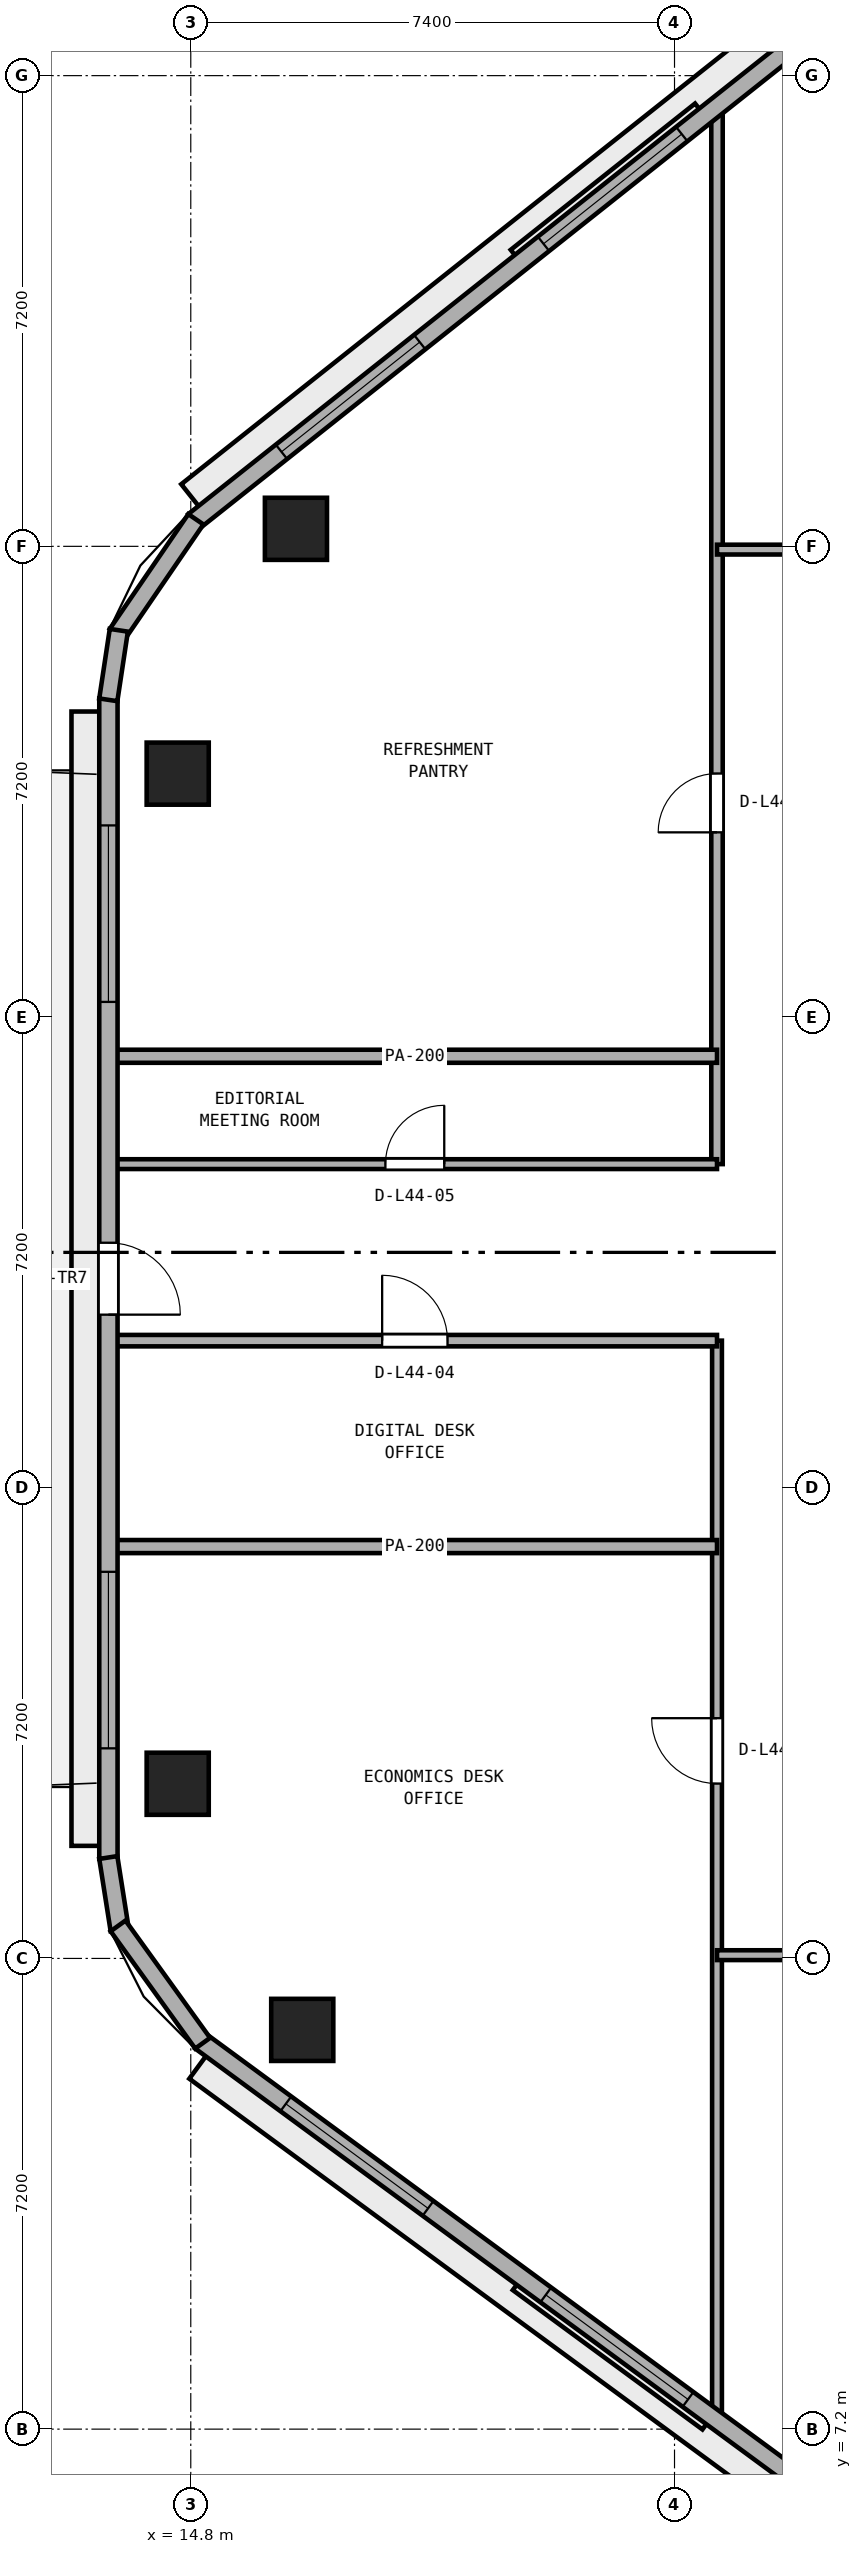
"""IFC4 building model, lengths in metres.
Left out: names, types, materials, properties, quantities, classifications, styles, units other than length and angle.
Written with IfcOpenShell. Run it as: python <this file> out.ifc"""

import sys

from ifc_helpers import new_model, si_unit, direction, frame, frame_2d, origin, origin_2d, place, context, subcontext, project, spatial, rectangle, extrude, element, fill, save


model = new_model("IFC4")
c1 = context("Model", 3, precision=1e-05, world=origin(), true_north=direction((0.0, 1.0)))
c2 = subcontext(c1, "Body", "Model", "MODEL_VIEW")
j1 = project(units=[si_unit("LENGTHUNIT", "METRE"), si_unit("PLANEANGLEUNIT", "RADIAN")], contexts=[c1])
p1 = place(None, origin())
s1 = spatial("IfcSite", under=j1, at=p1, CompositionType="ELEMENT")
p2 = place(p1, origin())
s2 = spatial("IfcBuilding", under=s1, at=p2, CompositionType="ELEMENT")
p3 = place(p2, frame((0.0, 0.0, 174.4)))
s3 = spatial("IfcBuildingStorey", under=s2, at=p3, CompositionType="ELEMENT", Elevation=174.4)
for number, where, z_axis, x_axis in (
    (1, (16.409, 36.268, 0.0), (0.0, 0.0, 1.0), (1.0, 0.0, 0.0)),
    (2, (14.6, 32.523, 0.0), (0.0, 0.0, 1.0), (1.0, 0.0, 0.0)),
    (3, (14.6, 17.072, 0.0), (0.0, 0.0, 1.0), (1.0, 0.0, 0.0)),
    (4, (16.505, 13.307, 0.0), (0.0, 0.0, 1.0), (1.0, 0.0, 0.0)),
):
    element("IfcColumn", number, at=place(p3, frame(where, z_axis=z_axis, x_axis=x_axis)), inside=s3, PredefinedType="COLUMN", context=c2, shape_type="SweptSolid", body=[
        extrude(rectangle(XDim=0.95, YDim=0.95, at=origin_2d()), origin(), (0.0, 0.0, 1.0), 3.8),
    ])
p4 = place(p3, frame((22.85, 7.295, 0.0), z_axis=(0.0, 0.0, 1.0), x_axis=(0.0, 1.0, 0.0)))
e5 = element("IfcWall", 5, at=p4, inside=s3, PredefinedType="PARTITIONING", context=c2, shape_type="SweptSolid", body=[
    extrude(rectangle(XDim=16.555, YDim=0.15, at=frame_2d((8.277, 0.0))), origin(), (0.0, 0.0, 1.0), 3.54),
])
p5 = place(p4, frame((9.78, 0.0, 0.0)))
e6 = element("IfcOpeningElement", 6, at=p5, cuts=e5, PredefinedType="OPENING", context=c2, shape_type="SweptSolid", body=[
    extrude(rectangle(XDim=1.0, YDim=2.12, at=frame_2d((0.5, 1.06))), frame((0.0, 0.085, 0.0), z_axis=(0.0, -1.0, 0.0), x_axis=(1.0, 0.0, 0.0)), (0.0, 0.0, 1.0), 0.17),
])
p6 = place(p3, frame((22.85, 26.55, 0.0), z_axis=(0.0, 0.0, 1.0), x_axis=(0.0, 1.0, 0.0)))
e7 = element("IfcWall", 7, at=p6, inside=s3, PredefinedType="PARTITIONING", context=c2, shape_type="SweptSolid", body=[
    extrude(rectangle(XDim=16.222, YDim=0.175, at=frame_2d((8.111, 0.0))), origin(), (0.0, 0.0, 1.0), 3.54),
])
p7 = place(p6, frame((5.075, 0.0, 0.0)))
e8 = element("IfcOpeningElement", 8, at=p7, cuts=e7, PredefinedType="OPENING", context=c2, shape_type="SweptSolid", body=[
    extrude(rectangle(XDim=0.9, YDim=2.1, at=frame_2d((0.45, 1.05))), frame((0.0, 0.097, 0.0), z_axis=(0.0, -1.0, 0.0), x_axis=(1.0, 0.0, 0.0)), (0.0, 0.0, 1.0), 0.195),
])
p8 = place(p3, frame((22.85, 14.45, 0.0), z_axis=(0.0, 0.0, 1.0), x_axis=(1.0, 0.0, 0.0)))
e9 = element("IfcWall", 9, at=p8, inside=s3, PredefinedType="PARTITIONING", context=c2, shape_type="SweptSolid", body=[
    extrude(rectangle(XDim=28.3, YDim=0.15, at=frame_2d((14.15, 0.0))), origin(), (0.0, 0.0, 1.0), 3.54),
])
p9 = place(p8, frame((13.65, 0.0, 0.0)))
e10 = element("IfcOpeningElement", 10, at=p9, cuts=e9, PredefinedType="OPENING", context=c2, shape_type="SweptSolid", body=[
    extrude(rectangle(XDim=1.0, YDim=2.12, at=frame_2d((0.5, 1.06))), frame((0.0, 0.085, 0.0), z_axis=(0.0, -1.0, 0.0), x_axis=(1.0, 0.0, 0.0)), (0.0, 0.0, 1.0), 0.17),
])
p10 = place(p3, frame((13.605, 20.7, 0.0), z_axis=(0.0, 0.0, 1.0), x_axis=(1.0, 0.0, 0.0)))
e11 = element("IfcWall", 11, at=p10, inside=s3, PredefinedType="PARTITIONING", context=c2, shape_type="SweptSolid", body=[
    extrude(rectangle(XDim=9.245, YDim=0.2, at=frame_2d((4.623, 0.0))), origin(), (0.0, 0.0, 1.0), 3.54),
])
p11 = place(p3, frame((13.605, 23.85, 0.0), z_axis=(0.0, 0.0, 1.0), x_axis=(1.0, 0.0, 0.0)))
e12 = element("IfcWall", 12, at=p11, inside=s3, PredefinedType="PARTITIONING", context=c2, shape_type="SweptSolid", body=[
    extrude(rectangle(XDim=9.245, YDim=0.175, at=frame_2d((4.623, 0.0))), origin(), (0.0, 0.0, 1.0), 3.54),
])
p12 = place(p11, frame((4.123, 0.0, 0.0)))
e13 = element("IfcOpeningElement", 13, at=p12, cuts=e12, PredefinedType="OPENING", context=c2, shape_type="SweptSolid", body=[
    extrude(rectangle(XDim=1.0, YDim=2.12, at=frame_2d((0.5, 1.06))), frame((0.0, 0.097, 0.0), z_axis=(0.0, -1.0, 0.0), x_axis=(1.0, 0.0, 0.0)), (0.0, 0.0, 1.0), 0.195),
])
p13 = place(p3, frame((13.605, 26.55, 0.0), z_axis=(0.0, 0.0, 1.0), x_axis=(1.0, 0.0, 0.0)))
e14 = element("IfcWall", 14, at=p13, inside=s3, PredefinedType="PARTITIONING", context=c2, shape_type="SweptSolid", body=[
    extrude(rectangle(XDim=9.245, YDim=0.15, at=frame_2d((4.623, 0.0))), origin(), (0.0, 0.0, 1.0), 3.54),
])
p14 = place(p13, frame((4.173, 0.0, 0.0)))
e15 = element("IfcOpeningElement", 15, at=p14, cuts=e14, PredefinedType="OPENING", context=c2, shape_type="SweptSolid", body=[
    extrude(rectangle(XDim=0.9, YDim=2.1, at=frame_2d((0.45, 1.05))), frame((0.0, 0.085, 0.0), z_axis=(0.0, -1.0, 0.0), x_axis=(1.0, 0.0, 0.0)), (0.0, 0.0, 1.0), 0.17),
])
p15 = place(p3, frame((13.605, 28.2, 0.0), z_axis=(0.0, 0.0, 1.0), x_axis=(1.0, 0.0, 0.0)))
e16 = element("IfcWall", 16, at=p15, inside=s3, PredefinedType="PARTITIONING", context=c2, shape_type="SweptSolid", body=[
    extrude(rectangle(XDim=9.245, YDim=0.2, at=frame_2d((4.623, 0.0))), origin(), (0.0, 0.0, 1.0), 3.54),
])
p16 = place(p3, frame((22.85, 35.95, 0.0), z_axis=(0.0, 0.0, 1.0), x_axis=(1.0, 0.0, 0.0)))
e17 = element("IfcWall", 17, at=p16, inside=s3, PredefinedType="PARTITIONING", context=c2, shape_type="SweptSolid", body=[
    extrude(rectangle(XDim=11.55, YDim=0.15, at=frame_2d((5.775, 0.0))), origin(), (0.0, 0.0, 1.0), 3.54),
])
p17 = place(p16, frame((5.275, 0.0, 0.0)))
e18 = element("IfcOpeningElement", 18, at=p17, cuts=e17, PredefinedType="OPENING", context=c2, shape_type="SweptSolid", body=[
    extrude(rectangle(XDim=1.0, YDim=2.12, at=frame_2d((0.5, 1.06))), frame((0.0, 0.085, 0.0), z_axis=(0.0, -1.0, 0.0), x_axis=(1.0, 0.0, 0.0)), (0.0, 0.0, 1.0), 0.17),
])
p18 = place(p3, frame((27.658, 46.55, 0.0), z_axis=(0.0, 0.0, 1.0), x_axis=(-0.783266285861, -0.621686356158, 0.0)))
e19 = element("IfcWall", 19, at=p18, inside=s3, PredefinedType="STANDARD", context=c2, shape_type="SweptSolid", body=[
    extrude(rectangle(XDim=16.353, YDim=0.28, at=frame_2d((8.177, 0.0))), origin(), (0.0, 0.0, 1.0), 3.54),
])
p19 = place(p18, frame((1.709, 0.0, 0.9)))
e20 = element("IfcOpeningElement", 20, at=p19, cuts=e19, PredefinedType="OPENING", context=c2, shape_type="SweptSolid", body=[
    extrude(rectangle(XDim=2.7, YDim=1.75, at=frame_2d((1.35, 0.875))), frame((0.0, 0.15, 0.0), z_axis=(0.0, -1.0, 0.0), x_axis=(1.0, 0.0, 0.0)), (0.0, 0.0, 1.0), 0.3),
])
p20 = place(p18, frame((6.826, 0.0, 0.9)))
e21 = element("IfcOpeningElement", 21, at=p20, cuts=e19, PredefinedType="OPENING", context=c2, shape_type="SweptSolid", body=[
    extrude(rectangle(XDim=2.7, YDim=1.75, at=frame_2d((1.35, 0.875))), frame((0.0, 0.15, 0.0), z_axis=(0.0, -1.0, 0.0), x_axis=(1.0, 0.0, 0.0)), (0.0, 0.0, 1.0), 0.3),
])
p21 = place(p18, frame((11.944, 0.0, 0.9)))
e22 = element("IfcOpeningElement", 22, at=p21, cuts=e19, PredefinedType="OPENING", context=c2, shape_type="SweptSolid", body=[
    extrude(rectangle(XDim=2.7, YDim=1.75, at=frame_2d((1.35, 0.875))), frame((0.0, 0.15, 0.0), z_axis=(0.0, -1.0, 0.0), x_axis=(1.0, 0.0, 0.0)), (0.0, 0.0, 1.0), 0.3),
])
p22 = place(p3, frame((13.54, 33.673, 0.0), z_axis=(0.0, 0.0, 1.0), x_axis=(0.0, -1.0, 0.0)))
e23 = element("IfcWall", 23, at=p22, inside=s3, PredefinedType="STANDARD", context=c2, shape_type="SweptSolid", body=[
    extrude(rectangle(XDim=17.751, YDim=0.28, at=frame_2d((8.875, 0.0))), origin(), (0.0, 0.0, 1.0), 3.54),
])
p23 = place(p22, frame((8.326, 0.0, 0.0)))
e24 = element("IfcOpeningElement", 24, at=p23, cuts=e23, PredefinedType="OPENING", context=c2, shape_type="SweptSolid", body=[
    extrude(rectangle(XDim=1.1, YDim=2.2, at=frame_2d((0.55, 1.1))), frame((0.0, 0.15, 0.0), z_axis=(0.0, -1.0, 0.0), x_axis=(1.0, 0.0, 0.0)), (0.0, 0.0, 1.0), 0.3),
])
p24 = place(p22, frame((1.942, 0.0, 0.9)))
e25 = element("IfcOpeningElement", 25, at=p24, cuts=e23, PredefinedType="OPENING", context=c2, shape_type="SweptSolid", body=[
    extrude(rectangle(XDim=2.7, YDim=1.75, at=frame_2d((1.35, 0.875))), frame((0.0, 0.15, 0.0), z_axis=(0.0, -1.0, 0.0), x_axis=(1.0, 0.0, 0.0)), (0.0, 0.0, 1.0), 0.3),
])
p25 = place(p22, frame((13.359, 0.0, 0.9)))
e26 = element("IfcOpeningElement", 26, at=p25, cuts=e23, PredefinedType="OPENING", context=c2, shape_type="SweptSolid", body=[
    extrude(rectangle(XDim=2.7, YDim=1.75, at=frame_2d((1.35, 0.875))), frame((0.0, 0.15, 0.0), z_axis=(0.0, -1.0, 0.0), x_axis=(1.0, 0.0, 0.0)), (0.0, 0.0, 1.0), 0.3),
])
p26 = place(p3, frame((14.951, 13.134, 0.0), z_axis=(0.0, 0.0, 1.0), x_axis=(0.805804940328, -0.592181051827, 0.0)))
e27 = element("IfcWall", 27, at=p26, inside=s3, PredefinedType="STANDARD", context=c2, shape_type="SweptSolid", body=[
    extrude(rectangle(XDim=15.804, YDim=0.28, at=frame_2d((7.902, 0.0))), origin(), (0.0, 0.0, 1.0), 3.54),
])
p27 = place(p26, frame((1.617, 0.0, 0.9)))
e28 = element("IfcOpeningElement", 28, at=p27, cuts=e27, PredefinedType="OPENING", context=c2, shape_type="SweptSolid", body=[
    extrude(rectangle(XDim=2.7, YDim=1.75, at=frame_2d((1.35, 0.875))), frame((0.0, 0.15, 0.0), z_axis=(0.0, -1.0, 0.0), x_axis=(1.0, 0.0, 0.0)), (0.0, 0.0, 1.0), 0.3),
])
p28 = place(p26, frame((6.552, 0.0, 0.9)))
e29 = element("IfcOpeningElement", 29, at=p28, cuts=e27, PredefinedType="OPENING", context=c2, shape_type="SweptSolid", body=[
    extrude(rectangle(XDim=2.7, YDim=1.75, at=frame_2d((1.35, 0.875))), frame((0.0, 0.15, 0.0), z_axis=(0.0, -1.0, 0.0), x_axis=(1.0, 0.0, 0.0)), (0.0, 0.0, 1.0), 0.3),
])
p29 = place(p26, frame((11.487, 0.0, 0.9)))
e30 = element("IfcOpeningElement", 30, at=p29, cuts=e27, PredefinedType="OPENING", context=c2, shape_type="SweptSolid", body=[
    extrude(rectangle(XDim=2.7, YDim=1.75, at=frame_2d((1.35, 0.875))), frame((0.0, 0.15, 0.0), z_axis=(0.0, -1.0, 0.0), x_axis=(1.0, 0.0, 0.0)), (0.0, 0.0, 1.0), 0.3),
])
p30 = place(p3, frame((14.878, 36.414, 0.0), z_axis=(0.0, 0.0, 1.0), x_axis=(-0.564564614133, -0.825388875906, 0.0)))
e31 = element("IfcWall", 31, at=p30, inside=s3, PredefinedType="STANDARD", context=c2, shape_type="SweptSolid", body=[
    extrude(rectangle(XDim=2.128, YDim=0.28, at=frame_2d((1.064, 0.0))), origin(), (0.0, 0.0, 1.0), 3.54),
])
p31 = place(p3, frame((13.699, 34.716, 0.0), z_axis=(0.0, 0.0, 1.0), x_axis=(-0.149549920187, -0.988754176412, 0.0)))
e32 = element("IfcWall", 32, at=p31, inside=s3, PredefinedType="STANDARD", context=c2, shape_type="SweptSolid", body=[
    extrude(rectangle(XDim=1.076, YDim=0.28, at=frame_2d((0.538, 0.0))), origin(), (0.0, 0.0, 1.0), 3.54),
])
p32 = place(p3, frame((13.538, 15.944, 0.0), z_axis=(0.0, 0.0, 1.0), x_axis=(0.155447556013, -0.987844146275, 0.0)))
e33 = element("IfcWall", 33, at=p32, inside=s3, PredefinedType="STANDARD", context=c2, shape_type="SweptSolid", body=[
    extrude(rectangle(XDim=1.12, YDim=0.28, at=frame_2d((0.56, 0.0))), origin(), (0.0, 0.0, 1.0), 3.54),
])
p33 = place(p3, frame((13.688, 14.898, 0.0), z_axis=(0.0, 0.0, 1.0), x_axis=(0.584833657716, -0.811153248655, 0.0)))
e34 = element("IfcWall", 34, at=p33, inside=s3, PredefinedType="STANDARD", context=c2, shape_type="SweptSolid", body=[
    extrude(rectangle(XDim=2.212, YDim=0.28, at=frame_2d((1.106, 0.0))), origin(), (0.0, 0.0, 1.0), 3.54),
])
p34 = place(p5, origin())
e35 = element("IfcDoor", 35, at=p34, inside=s3, OperationType="SINGLE_SWING_RIGHT", PredefinedType="DOOR", context=c2, shape_type="SweptSolid", body=[
    extrude(rectangle(XDim=1.0, YDim=2.12, at=frame_2d((0.5, 1.06))), frame((0.0, 0.025, 0.0), z_axis=(0.0, -1.0, 0.0), x_axis=(1.0, 0.0, 0.0)), (0.0, 0.0, 1.0), 0.05),
])
fill(e6, e35)
p35 = place(p12, origin())
e36 = element("IfcDoor", 36, at=p35, inside=s3, OperationType="SINGLE_SWING_LEFT", PredefinedType="DOOR", context=c2, shape_type="SweptSolid", body=[
    extrude(rectangle(XDim=1.0, YDim=2.12, at=frame_2d((0.5, 1.06))), frame((0.0, 0.025, 0.0), z_axis=(0.0, -1.0, 0.0), x_axis=(1.0, 0.0, 0.0)), (0.0, 0.0, 1.0), 0.05),
])
fill(e13, e36)
p36 = place(p14, origin())
e37 = element("IfcDoor", 37, at=p36, inside=s3, OperationType="SINGLE_SWING_RIGHT", PredefinedType="DOOR", context=c2, shape_type="SweptSolid", body=[
    extrude(rectangle(XDim=0.9, YDim=2.1, at=frame_2d((0.45, 1.05))), frame((0.0, 0.025, 0.0), z_axis=(0.0, -1.0, 0.0), x_axis=(1.0, 0.0, 0.0)), (0.0, 0.0, 1.0), 0.05),
])
fill(e15, e37)
p37 = place(p7, origin())
e38 = element("IfcDoor", 38, at=p37, inside=s3, OperationType="SINGLE_SWING_LEFT", PredefinedType="DOOR", context=c2, shape_type="SweptSolid", body=[
    extrude(rectangle(XDim=0.9, YDim=2.1, at=frame_2d((0.45, 1.05))), frame((0.0, 0.025, 0.0), z_axis=(0.0, -1.0, 0.0), x_axis=(1.0, 0.0, 0.0)), (0.0, 0.0, 1.0), 0.05),
])
fill(e8, e38)
p38 = place(p20, origin())
e39 = element("IfcWindow", 39, at=p38, inside=s3, PartitioningType="SINGLE_PANEL", PredefinedType="WINDOW", context=c2, shape_type="SweptSolid", body=[
    extrude(rectangle(XDim=2.7, YDim=1.75, at=frame_2d((1.35, 0.875))), frame((0.0, 0.03, 0.0), z_axis=(0.0, -1.0, 0.0), x_axis=(1.0, 0.0, 0.0)), (0.0, 0.0, 1.0), 0.06),
])
fill(e21, e39)
p39 = place(p21, origin())
e40 = element("IfcWindow", 40, at=p39, inside=s3, PartitioningType="SINGLE_PANEL", PredefinedType="WINDOW", context=c2, shape_type="SweptSolid", body=[
    extrude(rectangle(XDim=2.7, YDim=1.75, at=frame_2d((1.35, 0.875))), frame((0.0, 0.03, 0.0), z_axis=(0.0, -1.0, 0.0), x_axis=(1.0, 0.0, 0.0)), (0.0, 0.0, 1.0), 0.06),
])
fill(e22, e40)
p40 = place(p23, origin())
e41 = element("IfcDoor", 41, at=p40, inside=s3, OperationType="SINGLE_SWING_RIGHT", PredefinedType="DOOR", context=c2, shape_type="SweptSolid", body=[
    extrude(rectangle(XDim=1.1, YDim=2.2, at=frame_2d((0.55, 1.1))), frame((0.0, 0.025, 0.0), z_axis=(0.0, -1.0, 0.0), x_axis=(1.0, 0.0, 0.0)), (0.0, 0.0, 1.0), 0.05),
])
fill(e24, e41)
p41 = place(p24, origin())
e42 = element("IfcWindow", 42, at=p41, inside=s3, PartitioningType="SINGLE_PANEL", PredefinedType="WINDOW", context=c2, shape_type="SweptSolid", body=[
    extrude(rectangle(XDim=2.7, YDim=1.75, at=frame_2d((1.35, 0.875))), frame((0.0, 0.03, 0.0), z_axis=(0.0, -1.0, 0.0), x_axis=(1.0, 0.0, 0.0)), (0.0, 0.0, 1.0), 0.06),
])
fill(e25, e42)
p42 = place(p25, origin())
e43 = element("IfcWindow", 43, at=p42, inside=s3, PartitioningType="SINGLE_PANEL", PredefinedType="WINDOW", context=c2, shape_type="SweptSolid", body=[
    extrude(rectangle(XDim=2.7, YDim=1.75, at=frame_2d((1.35, 0.875))), frame((0.0, 0.03, 0.0), z_axis=(0.0, -1.0, 0.0), x_axis=(1.0, 0.0, 0.0)), (0.0, 0.0, 1.0), 0.06),
])
fill(e26, e43)
p43 = place(p27, origin())
e44 = element("IfcWindow", 44, at=p43, inside=s3, PartitioningType="SINGLE_PANEL", PredefinedType="WINDOW", context=c2, shape_type="SweptSolid", body=[
    extrude(rectangle(XDim=2.7, YDim=1.75, at=frame_2d((1.35, 0.875))), frame((0.0, 0.03, 0.0), z_axis=(0.0, -1.0, 0.0), x_axis=(1.0, 0.0, 0.0)), (0.0, 0.0, 1.0), 0.06),
])
fill(e28, e44)
p44 = place(p28, origin())
e45 = element("IfcWindow", 45, at=p44, inside=s3, PartitioningType="SINGLE_PANEL", PredefinedType="WINDOW", context=c2, shape_type="SweptSolid", body=[
    extrude(rectangle(XDim=2.7, YDim=1.75, at=frame_2d((1.35, 0.875))), frame((0.0, 0.03, 0.0), z_axis=(0.0, -1.0, 0.0), x_axis=(1.0, 0.0, 0.0)), (0.0, 0.0, 1.0), 0.06),
])
fill(e29, e45)
save(model, sys.argv[1])
